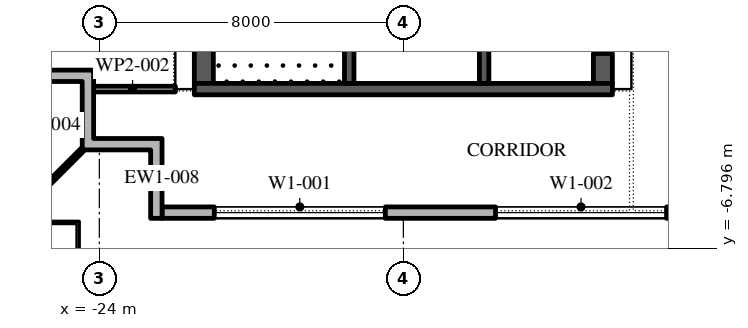
"""IFC4 building model, lengths in metres.
Left out: names, types, materials, properties, quantities, classifications, styles, units other than length and angle.
Written with IfcOpenShell. Run it as: python <this file> out.ifc"""

import sys

from ifc_helpers import new_model, si_unit, direction, frame, frame_2d, origin, place, context, subcontext, project, spatial, polyline, rectangle, outline, extrude, element, fill, save


model = new_model("IFC4")
c1 = context("Model", 3, precision=1e-05, world=origin(), true_north=direction((0.0, 1.0)))
c2 = subcontext(c1, "Body", "Model", "MODEL_VIEW")
j1 = project(units=[si_unit("LENGTHUNIT", "METRE"), si_unit("PLANEANGLEUNIT", "RADIAN")], contexts=[c1])
p1 = place(None, origin())
s1 = spatial("IfcSite", under=j1, at=p1, CompositionType="ELEMENT")
p2 = place(p1, origin())
s2 = spatial("IfcBuilding", under=s1, at=p2, CompositionType="ELEMENT")
p3 = place(p2, frame((0.0, 0.0, 334.2)))
s3 = spatial("IfcBuildingStorey", under=s2, at=p3, CompositionType="ELEMENT", Elevation=334.2)
p4 = place(p3, frame((-22.35, -5.85, 0.0), z_axis=(0.0, 0.0, 1.0), x_axis=(1.0, 0.0, 0.0)))
e1 = element("IfcWall", 1, at=p4, inside=s3, PredefinedType="STANDARD", context=c2, shape_type="SweptSolid", body=[
    extrude(rectangle(XDim=45.0, YDim=0.3, at=frame_2d((22.5, 0.0))), origin(), (0.0, 0.0, 1.0), 4.0),
])
p5 = place(p4, frame((1.375, 0.0, 0.45)))
e2 = element("IfcOpeningElement", 2, at=p5, cuts=e1, PredefinedType="OPENING", context=c2, shape_type="SweptSolid", body=[
    extrude(rectangle(XDim=4.5, YDim=3.05, at=frame_2d((2.25, 1.525))), frame((0.0, 0.16, 0.0), z_axis=(0.0, -1.0, 0.0), x_axis=(1.0, 0.0, 0.0)), (0.0, 0.0, 1.0), 0.32),
])
p6 = place(p4, frame((8.775, 0.0, 0.45)))
e3 = element("IfcOpeningElement", 3, at=p6, cuts=e1, PredefinedType="OPENING", context=c2, shape_type="SweptSolid", body=[
    extrude(rectangle(XDim=4.5, YDim=3.05, at=frame_2d((2.25, 1.525))), frame((0.0, 0.16, 0.0), z_axis=(0.0, -1.0, 0.0), x_axis=(1.0, 0.0, 0.0)), (0.0, 0.0, 1.0), 0.32),
])
p7 = place(p4, frame((17.375, 0.0, 0.0)))
e4 = element("IfcOpeningElement", 4, at=p7, cuts=e1, PredefinedType="OPENING", context=c2, shape_type="SweptSolid", body=[
    extrude(rectangle(XDim=2.4, YDim=3.5, at=frame_2d((1.2, 1.75))), frame((0.0, 0.16, 0.0), z_axis=(0.0, -1.0, 0.0), x_axis=(1.0, 0.0, 0.0)), (0.0, 0.0, 1.0), 0.32),
])
p8 = place(p4, frame((23.875, 0.0, 0.45)))
e5 = element("IfcOpeningElement", 5, at=p8, cuts=e1, PredefinedType="OPENING", context=c2, shape_type="SweptSolid", body=[
    extrude(rectangle(XDim=4.5, YDim=3.05, at=frame_2d((2.25, 1.525))), frame((0.0, 0.16, 0.0), z_axis=(0.0, -1.0, 0.0), x_axis=(1.0, 0.0, 0.0)), (0.0, 0.0, 1.0), 0.32),
])
p9 = place(p4, frame((31.425, 0.0, 0.45)))
e6 = element("IfcOpeningElement", 6, at=p9, cuts=e1, PredefinedType="OPENING", context=c2, shape_type="SweptSolid", body=[
    extrude(rectangle(XDim=4.5, YDim=3.05, at=frame_2d((2.25, 1.525))), frame((0.0, 0.16, 0.0), z_axis=(0.0, -1.0, 0.0), x_axis=(1.0, 0.0, 0.0)), (0.0, 0.0, 1.0), 0.32),
])
p10 = place(p4, frame((38.975, 0.0, 0.45)))
e7 = element("IfcOpeningElement", 7, at=p10, cuts=e1, PredefinedType="OPENING", context=c2, shape_type="SweptSolid", body=[
    extrude(rectangle(XDim=4.5, YDim=3.05, at=frame_2d((2.25, 1.525))), frame((0.0, 0.16, 0.0), z_axis=(0.0, -1.0, 0.0), x_axis=(1.0, 0.0, 0.0)), (0.0, 0.0, 1.0), 0.32),
])
p11 = place(p3, origin())
e8 = element("IfcWall", 8, at=p11, inside=s3, PredefinedType="STANDARD", context=c2, shape_type="SweptSolid", body=[
    extrude(outline(polyline([(-22.65, -4.2), (-24.45, -4.2), (-24.45, -2.4), (-25.95, -2.4), (-25.95, -2.1), (-24.15, -2.1), (-24.15, -3.9), (-22.35, -3.9), (-22.35, -6.0), (-22.65, -6.0), (-22.65, -4.2)])), origin(), (0.0, 0.0, 1.0), 4.0),
])
p12 = place(p3, frame((-24.45, -4.2, -0.05), z_axis=(0.0, 0.0, 1.0), x_axis=(-0.707106781187, -0.707106781187, 0.0)))
e9 = element("IfcWall", 9, at=p12, inside=s3, PredefinedType="STANDARD", context=c2, shape_type="SweptSolid", body=[
    extrude(rectangle(XDim=2.667, YDim=0.1, at=frame_2d((1.333, 0.0))), origin(), (0.0, 0.0, 1.0), 4.05),
])
p13 = place(p3, frame((-21.25, -2.45, 0.0), z_axis=(0.0, 0.0, 1.0), x_axis=(0.0, 1.0, 0.0)))
e10 = element("IfcWall", 10, at=p13, inside=s3, PredefinedType="SHEAR", context=c2, shape_type="SweptSolid", body=[
    extrude(rectangle(XDim=27.9, YDim=0.5, at=frame_2d((13.95, 0.0))), origin(), (0.0, 0.0, 1.0), 4.0),
])
p14 = place(p13, frame((5.05, 0.0, 0.0)))
e11 = element("IfcOpeningElement", 11, at=p14, cuts=e10, PredefinedType="OPENING", context=c2, shape_type="SweptSolid", body=[
    extrude(rectangle(XDim=1.2, YDim=2.1, at=frame_2d((0.6, 1.05))), frame((0.0, 0.26, 0.0), z_axis=(0.0, -1.0, 0.0), x_axis=(1.0, 0.0, 0.0)), (0.0, 0.0, 1.0), 0.52),
])
p15 = place(p13, frame((21.65, 0.0, 0.0)))
e12 = element("IfcOpeningElement", 12, at=p15, cuts=e10, PredefinedType="OPENING", context=c2, shape_type="SweptSolid", body=[
    extrude(rectangle(XDim=1.2, YDim=2.1, at=frame_2d((0.6, 1.05))), frame((0.0, 0.26, 0.0), z_axis=(0.0, -1.0, 0.0), x_axis=(1.0, 0.0, 0.0)), (0.0, 0.0, 1.0), 0.52),
])
p16 = place(p3, frame((-10.75, -2.45, 0.0), z_axis=(0.0, 0.0, 1.0), x_axis=(0.0, 1.0, 0.0)))
e13 = element("IfcWall", 13, at=p16, inside=s3, PredefinedType="SHEAR", context=c2, shape_type="SweptSolid", body=[
    extrude(rectangle(XDim=27.9, YDim=0.5, at=frame_2d((13.95, 0.0))), origin(), (0.0, 0.0, 1.0), 4.0),
])
p17 = place(p16, frame((23.65, 0.0, 0.0)))
e14 = element("IfcOpeningElement", 14, at=p17, cuts=e13, PredefinedType="OPENING", context=c2, shape_type="SweptSolid", body=[
    extrude(rectangle(XDim=2.4, YDim=2.1, at=frame_2d((1.2, 1.05))), frame((0.0, 0.26, 0.0), z_axis=(0.0, -1.0, 0.0), x_axis=(1.0, 0.0, 0.0)), (0.0, 0.0, 1.0), 0.52),
])
p18 = place(p16, frame((0.788, 0.0, 0.0)))
e15 = element("IfcOpeningElement", 15, at=p18, cuts=e13, PredefinedType="OPENING", context=c2, shape_type="SweptSolid", body=[
    extrude(rectangle(XDim=0.9, YDim=2.1, at=frame_2d((0.45, 1.05))), frame((0.0, 0.26, 0.0), z_axis=(0.0, -1.0, 0.0), x_axis=(1.0, 0.0, 0.0)), (0.0, 0.0, 1.0), 0.52),
])
p19 = place(p16, frame((3.962, 0.0, 0.0)))
e16 = element("IfcOpeningElement", 16, at=p19, cuts=e13, PredefinedType="OPENING", context=c2, shape_type="SweptSolid", body=[
    extrude(rectangle(XDim=1.0, YDim=2.1, at=frame_2d((0.5, 1.05))), frame((0.0, 0.26, 0.0), z_axis=(0.0, -1.0, 0.0), x_axis=(1.0, 0.0, 0.0)), (0.0, 0.0, 1.0), 0.52),
])
p20 = place(p3, frame((-21.5, -2.6, 0.0), z_axis=(0.0, 0.0, 1.0), x_axis=(1.0, 0.0, 0.0)))
e17 = element("IfcWall", 17, at=p20, inside=s3, PredefinedType="SHEAR", context=c2, shape_type="SweptSolid", body=[
    extrude(rectangle(XDim=11.0, YDim=0.3, at=frame_2d((5.5, 0.0))), origin(), (0.0, 0.0, 1.0), 4.0),
])
p21 = place(p3, frame((-17.425, -2.45, 0.0), z_axis=(0.0, 0.0, 1.0), x_axis=(0.0, 1.0, 0.0)))
e18 = element("IfcWall", 18, at=p21, inside=s3, PredefinedType="SHEAR", context=c2, shape_type="SweptSolid", body=[
    extrude(rectangle(XDim=6.3, YDim=0.25, at=frame_2d((3.15, 0.0))), origin(), (0.0, 0.0, 1.0), 4.0),
])
p22 = place(p21, frame((5.05, 0.0, 0.0)))
e19 = element("IfcOpeningElement", 19, at=p22, cuts=e18, PredefinedType="OPENING", context=c2, shape_type="SweptSolid", body=[
    extrude(rectangle(XDim=1.2, YDim=2.1, at=frame_2d((0.6, 1.05))), frame((0.0, 0.135, 0.0), z_axis=(0.0, -1.0, 0.0), x_axis=(1.0, 0.0, 0.0)), (0.0, 0.0, 1.0), 0.27),
])
p23 = place(p3, frame((-13.875, -2.45, 0.0), z_axis=(0.0, 0.0, 1.0), x_axis=(0.0, 1.0, 0.0)))
e20 = element("IfcWall", 20, at=p23, inside=s3, PredefinedType="SHEAR", context=c2, shape_type="SweptSolid", body=[
    extrude(rectangle(XDim=21.3, YDim=0.25, at=frame_2d((10.65, 0.0))), origin(), (0.0, 0.0, 1.0), 4.0),
])
p24 = place(p23, frame((11.357, 0.0, 0.0)))
e21 = element("IfcOpeningElement", 21, at=p24, cuts=e20, PredefinedType="OPENING", context=c2, shape_type="SweptSolid", body=[
    extrude(rectangle(XDim=0.9, YDim=2.1, at=frame_2d((0.45, 1.05))), frame((0.0, 0.135, 0.0), z_axis=(0.0, -1.0, 0.0), x_axis=(1.0, 0.0, 0.0)), (0.0, 0.0, 1.0), 0.27),
])
p25 = place(p23, frame((6.971, 0.0, 0.0)))
e22 = element("IfcOpeningElement", 22, at=p25, cuts=e20, PredefinedType="OPENING", context=c2, shape_type="SweptSolid", body=[
    extrude(rectangle(XDim=1.1, YDim=2.1, at=frame_2d((0.55, 1.05))), frame((0.0, 0.135, 0.0), z_axis=(0.0, -1.0, 0.0), x_axis=(1.0, 0.0, 0.0)), (0.0, 0.0, 1.0), 0.27),
])
p26 = place(p23, frame((15.543, 0.0, 0.0)))
e23 = element("IfcOpeningElement", 23, at=p26, cuts=e20, PredefinedType="OPENING", context=c2, shape_type="SweptSolid", body=[
    extrude(rectangle(XDim=1.1, YDim=2.1, at=frame_2d((0.55, 1.05))), frame((0.0, 0.135, 0.0), z_axis=(0.0, -1.0, 0.0), x_axis=(1.0, 0.0, 0.0)), (0.0, 0.0, 1.0), 0.27),
])
p27 = place(p23, frame((17.686, 0.0, 0.0)))
e24 = element("IfcOpeningElement", 24, at=p27, cuts=e20, PredefinedType="OPENING", context=c2, shape_type="SweptSolid", body=[
    extrude(rectangle(XDim=1.1, YDim=2.1, at=frame_2d((0.55, 1.05))), frame((0.0, 0.135, 0.0), z_axis=(0.0, -1.0, 0.0), x_axis=(1.0, 0.0, 0.0)), (0.0, 0.0, 1.0), 0.27),
])
p28 = place(p23, frame((19.829, 0.0, 0.0)))
e25 = element("IfcOpeningElement", 25, at=p28, cuts=e20, PredefinedType="OPENING", context=c2, shape_type="SweptSolid", body=[
    extrude(rectangle(XDim=1.1, YDim=2.1, at=frame_2d((0.55, 1.05))), frame((0.0, 0.135, 0.0), z_axis=(0.0, -1.0, 0.0), x_axis=(1.0, 0.0, 0.0)), (0.0, 0.0, 1.0), 0.27),
])
p29 = place(p3, frame((-24.25, -2.6, 0.0), z_axis=(0.0, 0.0, 1.0), x_axis=(1.0, 0.0, 0.0)))
e26 = element("IfcWall", 26, at=p29, inside=s3, PredefinedType="PARTITIONING", context=c2, shape_type="SweptSolid", body=[
    extrude(rectangle(XDim=2.25, YDim=0.15, at=frame_2d((1.125, 0.0))), origin(), (0.0, 0.0, 1.0), 4.0),
])
p30 = place(p5, origin())
e27 = element("IfcWindow", 27, at=p30, inside=s3, PartitioningType="DOUBLE_PANEL_VERTICAL", PredefinedType="WINDOW", context=c2, shape_type="SweptSolid", body=[
    extrude(rectangle(XDim=4.5, YDim=3.05, at=frame_2d((2.25, 1.525))), frame((0.0, 0.03, 0.0), z_axis=(0.0, -1.0, 0.0), x_axis=(1.0, 0.0, 0.0)), (0.0, 0.0, 1.0), 0.06),
])
fill(e2, e27)
p31 = place(p6, origin())
e28 = element("IfcWindow", 28, at=p31, inside=s3, PartitioningType="DOUBLE_PANEL_VERTICAL", PredefinedType="WINDOW", context=c2, shape_type="SweptSolid", body=[
    extrude(rectangle(XDim=4.5, YDim=3.05, at=frame_2d((2.25, 1.525))), frame((0.0, 0.03, 0.0), z_axis=(0.0, -1.0, 0.0), x_axis=(1.0, 0.0, 0.0)), (0.0, 0.0, 1.0), 0.06),
])
fill(e3, e28)
p32 = place(p18, frame((0.9, 0.45, 0.0), z_axis=(0.0, 0.0, 1.0), x_axis=(-1.0, 0.0, 0.0)))
e29 = element("IfcDoor", 29, at=p32, inside=s3, OperationType="SINGLE_SWING_RIGHT", PredefinedType="DOOR", context=c2, shape_type="SweptSolid", body=[
    extrude(rectangle(XDim=0.9, YDim=2.1, at=frame_2d((0.45, 1.05))), frame((0.0, 0.25, 0.0), z_axis=(0.0, -1.0, 0.0), x_axis=(1.0, 0.0, 0.0)), (0.0, 0.0, 1.0), 0.05),
])
fill(e15, e29)
save(model, sys.argv[1])
